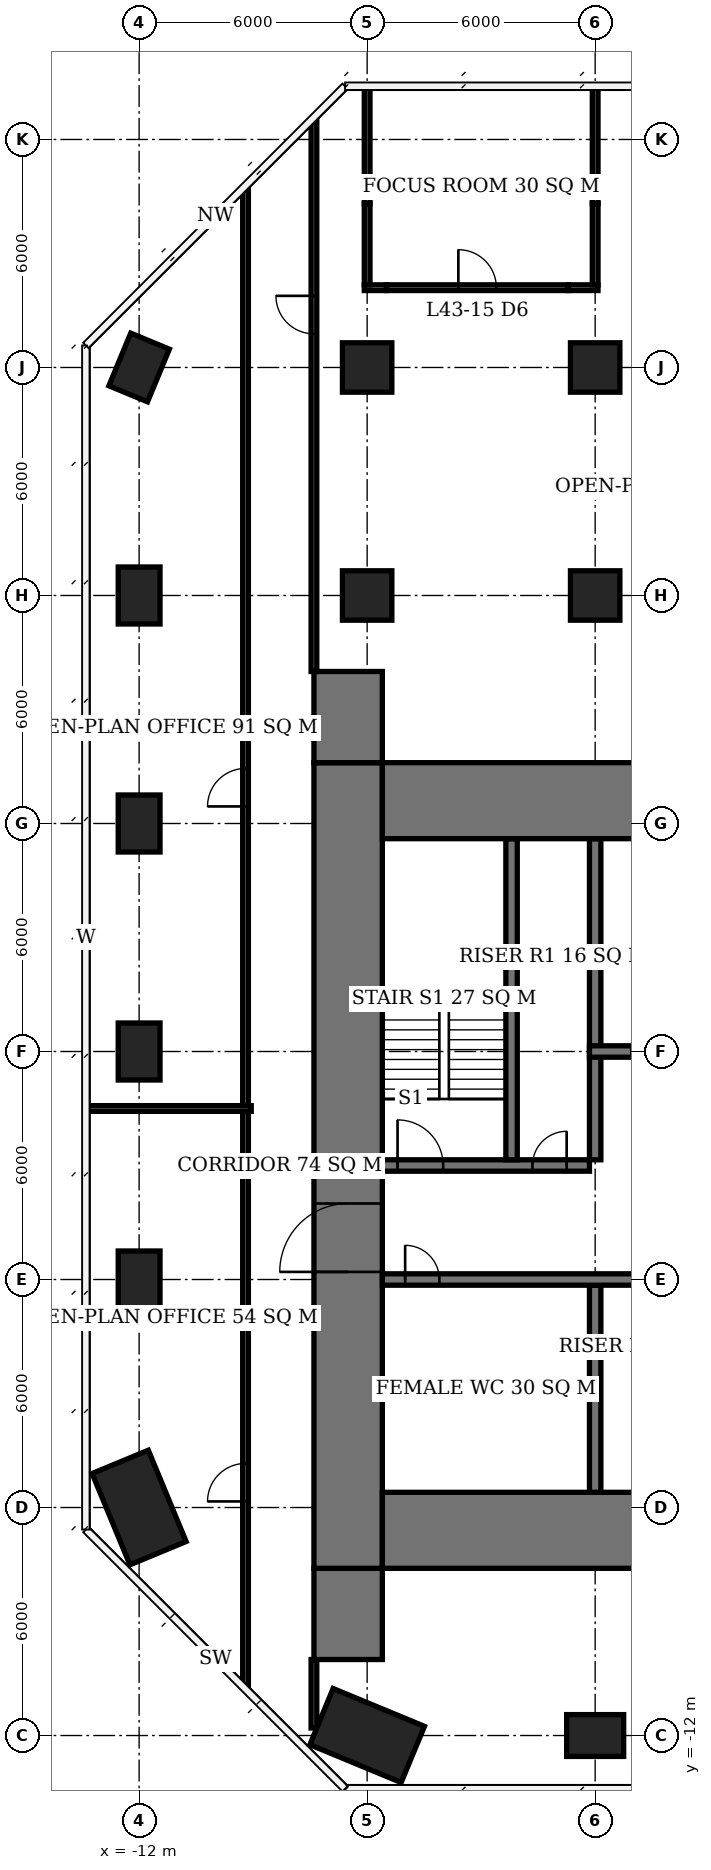
"""IFC4 building model, lengths in metres.
Left out: names, types, materials, properties, quantities, classifications, styles, units other than length and angle.
Written with IfcOpenShell. Run it as: python <this file> out.ifc"""

import sys

from ifc_helpers import new_model, si_unit, direction, frame, frame_2d, origin, origin_2d, place, context, subcontext, project, spatial, rectangle, extrude, element, fill, save


model = new_model("IFC4")
c1 = context("Model", 3, precision=1e-05, world=origin(), true_north=direction((0.0, 1.0)))
c2 = subcontext(c1, "Body", "Model", "MODEL_VIEW")
j1 = project(units=[si_unit("LENGTHUNIT", "METRE"), si_unit("PLANEANGLEUNIT", "RADIAN")], contexts=[c1])
p1 = place(None, origin())
s1 = spatial("IfcSite", under=j1, at=p1, CompositionType="ELEMENT")
p2 = place(p1, origin())
s2 = spatial("IfcBuilding", under=s1, at=p2, CompositionType="ELEMENT")
p3 = place(p2, frame((0.0, 0.0, 177.2)))
s3 = spatial("IfcBuildingStorey", under=s2, at=p3, CompositionType="ELEMENT", Elevation=177.2)
p4 = place(p3, frame((-12.0, -6.0, 0.0), z_axis=(0.0, 0.0, 1.0), x_axis=(-0.382683432365, 0.923879532511, 0.0)))
e1 = element("IfcColumn", 1, at=p4, inside=s3, PredefinedType="COLUMN", context=c2, shape_type="SweptSolid", body=[
    extrude(rectangle(XDim=2.6, YDim=1.6, at=origin_2d()), origin(), (0.0, 0.0, 1.0), 3.9),
])
for number, where, z_axis, x_axis in (
    (2, (-12.0, 0.0, 0.0), (0.0, 0.0, 1.0), (0.0, 1.0, 0.0)),
    (3, (-12.0, 6.0, 0.0), (0.0, 0.0, 1.0), (0.0, 1.0, 0.0)),
    (4, (-12.0, 12.0, 0.0), (0.0, 0.0, 1.0), (0.0, 1.0, 0.0)),
    (5, (-12.0, 18.0, 0.0), (0.0, 0.0, 1.0), (0.0, 1.0, 0.0)),
    (6, (-12.0, 24.0, 0.0), (0.0, 0.0, 1.0), (0.383, 0.924, 0.0)),
):
    element("IfcColumn", number, at=place(p3, frame(where, z_axis=z_axis, x_axis=x_axis)), inside=s3, PredefinedType="COLUMN", context=c2, shape_type="SweptSolid", body=[
        extrude(rectangle(XDim=1.5, YDim=1.1, at=origin_2d()), origin(), (0.0, 0.0, 1.0), 3.9),
    ])
p5 = place(p3, frame((-6.0, -12.0, 0.0), z_axis=(0.0, 0.0, 1.0), x_axis=(-0.923879532511, 0.382683432365, 0.0)))
e7 = element("IfcColumn", 7, at=p5, inside=s3, PredefinedType="COLUMN", context=c2, shape_type="SweptSolid", body=[
    extrude(rectangle(XDim=2.6, YDim=1.6, at=origin_2d()), origin(), (0.0, 0.0, 1.0), 3.9),
])
for number, where, z_axis, x_axis in (
    (8, (-6.0, 18.0, 0.0), (0.0, 0.0, 1.0), (1.0, 0.0, 0.0)),
    (9, (-6.0, 24.0, 0.0), (0.0, 0.0, 1.0), (1.0, 0.0, 0.0)),
):
    element("IfcColumn", number, at=place(p3, frame(where, z_axis=z_axis, x_axis=x_axis)), inside=s3, PredefinedType="COLUMN", context=c2, shape_type="SweptSolid", body=[
        extrude(rectangle(XDim=1.3, YDim=1.3, at=origin_2d()), origin(), (0.0, 0.0, 1.0), 3.9),
    ])
p6 = place(p3, frame((0.0, -12.0, 0.0), z_axis=(0.0, 0.0, 1.0), x_axis=(1.0, 0.0, 0.0)))
e10 = element("IfcColumn", 10, at=p6, inside=s3, PredefinedType="COLUMN", context=c2, shape_type="SweptSolid", body=[
    extrude(rectangle(XDim=1.5, YDim=1.1, at=origin_2d()), origin(), (0.0, 0.0, 1.0), 3.9),
])
for number, where, z_axis, x_axis in (
    (11, (0.0, 18.0, 0.0), (0.0, 0.0, 1.0), (1.0, 0.0, 0.0)),
    (12, (0.0, 24.0, 0.0), (0.0, 0.0, 1.0), (1.0, 0.0, 0.0)),
):
    element("IfcColumn", number, at=place(p3, frame(where, z_axis=z_axis, x_axis=x_axis)), inside=s3, PredefinedType="COLUMN", context=c2, shape_type="SweptSolid", body=[
        extrude(rectangle(XDim=1.3, YDim=1.3, at=origin_2d()), origin(), (0.0, 0.0, 1.0), 3.9),
    ])
for number, where, z_axis, x_axis in (
    (13, (-5.6, -6.6, 0.0), (0.0, 0.0, 1.0), (1.0, 0.0, 0.0)),
    (14, (-5.6, 12.6, 0.0), (0.0, 0.0, 1.0), (1.0, 0.0, 0.0)),
):
    element("IfcWall", number, at=place(p3, frame(where, z_axis=z_axis, x_axis=x_axis)), inside=s3, PredefinedType="SHEAR", context=c2, shape_type="SweptSolid", body=[
        extrude(rectangle(XDim=23.2, YDim=2.0, at=frame_2d((11.6, 0.0))), origin(), (0.0, 0.0, 1.0), 3.9),
    ])
p7 = place(p3, frame((-6.5, -7.6, 0.0), z_axis=(0.0, 0.0, 1.0), x_axis=(0.0, 1.0, 0.0)))
e15 = element("IfcWall", 15, at=p7, inside=s3, PredefinedType="SHEAR", context=c2, shape_type="SweptSolid", body=[
    extrude(rectangle(XDim=21.2, YDim=1.8, at=frame_2d((10.6, 0.0))), origin(), (0.0, 0.0, 1.0), 3.9),
])
p8 = place(p7, frame((7.8, 0.0, 0.0)))
e16 = element("IfcOpeningElement", 16, at=p8, cuts=e15, PredefinedType="OPENING", context=c2, shape_type="SweptSolid", body=[
    extrude(rectangle(XDim=1.8, YDim=2.4, at=frame_2d((0.9, 1.2))), frame((0.0, 0.91, 0.0), z_axis=(0.0, -1.0, 0.0), x_axis=(1.0, 0.0, 0.0)), (0.0, 0.0, 1.0), 1.82),
])
for number, where, z_axis, x_axis in (
    (17, (-6.5, -10.0, 0.0), (0.0, 0.0, 1.0), (0.0, 1.0, 0.0)),
    (18, (-6.5, 13.6, 0.0), (0.0, 0.0, 1.0), (0.0, 1.0, 0.0)),
):
    element("IfcWall", number, at=place(p3, frame(where, z_axis=z_axis, x_axis=x_axis)), inside=s3, PredefinedType="SHEAR", context=c2, shape_type="SweptSolid", body=[
        extrude(rectangle(XDim=2.4, YDim=1.8, at=frame_2d((1.2, 0.0))), origin(), (0.0, 0.0, 1.0), 3.9),
    ])
p9 = place(p3, frame((-5.6, 0.0, 0.0), z_axis=(0.0, 0.0, 1.0), x_axis=(1.0, 0.0, 0.0)))
e19 = element("IfcWall", 19, at=p9, inside=s3, PredefinedType="SHEAR", context=c2, shape_type="SweptSolid", body=[
    extrude(rectangle(XDim=17.75, YDim=0.3, at=frame_2d((8.875, 0.0))), origin(), (0.0, 0.0, 1.0), 3.9),
])
p10 = place(p9, frame((0.6, 0.0, 0.0)))
e20 = element("IfcOpeningElement", 20, at=p10, cuts=e19, PredefinedType="OPENING", context=c2, shape_type="SweptSolid", body=[
    extrude(rectangle(XDim=0.9, YDim=2.1, at=frame_2d((0.45, 1.05))), frame((0.0, 0.16, 0.0), z_axis=(0.0, -1.0, 0.0), x_axis=(1.0, 0.0, 0.0)), (0.0, 0.0, 1.0), 0.32),
])
p11 = place(p9, frame((9.6, 0.0, 0.0)))
e21 = element("IfcOpeningElement", 21, at=p11, cuts=e19, PredefinedType="OPENING", context=c2, shape_type="SweptSolid", body=[
    extrude(rectangle(XDim=1.0, YDim=2.1, at=frame_2d((0.5, 1.05))), frame((0.0, 0.16, 0.0), z_axis=(0.0, -1.0, 0.0), x_axis=(1.0, 0.0, 0.0)), (0.0, 0.0, 1.0), 0.32),
])
p12 = place(p9, frame((12.55, 0.0, 0.0)))
e22 = element("IfcOpeningElement", 22, at=p12, cuts=e19, PredefinedType="OPENING", context=c2, shape_type="SweptSolid", body=[
    extrude(rectangle(XDim=1.1, YDim=2.1, at=frame_2d((0.55, 1.05))), frame((0.0, 0.16, 0.0), z_axis=(0.0, -1.0, 0.0), x_axis=(1.0, 0.0, 0.0)), (0.0, 0.0, 1.0), 0.32),
])
p13 = place(p9, frame((15.55, 0.0, 0.0)))
e23 = element("IfcOpeningElement", 23, at=p13, cuts=e19, PredefinedType="OPENING", context=c2, shape_type="SweptSolid", body=[
    extrude(rectangle(XDim=1.1, YDim=2.1, at=frame_2d((0.55, 1.05))), frame((0.0, 0.16, 0.0), z_axis=(0.0, -1.0, 0.0), x_axis=(1.0, 0.0, 0.0)), (0.0, 0.0, 1.0), 0.32),
])
p14 = place(p3, frame((-5.6, 3.0, 0.0), z_axis=(0.0, 0.0, 1.0), x_axis=(1.0, 0.0, 0.0)))
e24 = element("IfcWall", 24, at=p14, inside=s3, PredefinedType="SHEAR", context=c2, shape_type="SweptSolid", body=[
    extrude(rectangle(XDim=5.45, YDim=0.3, at=frame_2d((2.725, 0.0))), origin(), (0.0, 0.0, 1.0), 3.9),
])
p15 = place(p14, frame((0.4, 0.0, 0.0)))
e25 = element("IfcOpeningElement", 25, at=p15, cuts=e24, PredefinedType="OPENING", context=c2, shape_type="SweptSolid", body=[
    extrude(rectangle(XDim=1.2, YDim=2.1, at=frame_2d((0.6, 1.05))), frame((0.0, 0.16, 0.0), z_axis=(0.0, -1.0, 0.0), x_axis=(1.0, 0.0, 0.0)), (0.0, 0.0, 1.0), 0.32),
])
p16 = place(p14, frame((3.95, 0.0, 0.0)))
e26 = element("IfcOpeningElement", 26, at=p16, cuts=e24, PredefinedType="OPENING", context=c2, shape_type="SweptSolid", body=[
    extrude(rectangle(XDim=0.9, YDim=2.1, at=frame_2d((0.45, 1.05))), frame((0.0, 0.16, 0.0), z_axis=(0.0, -1.0, 0.0), x_axis=(1.0, 0.0, 0.0)), (0.0, 0.0, 1.0), 0.32),
])
p17 = place(p3, frame((-0.15, 6.0, 0.0), z_axis=(0.0, 0.0, 1.0), x_axis=(1.0, 0.0, 0.0)))
e27 = element("IfcWall", 27, at=p17, inside=s3, PredefinedType="SHEAR", context=c2, shape_type="SweptSolid", body=[
    extrude(rectangle(XDim=17.75, YDim=0.3, at=frame_2d((8.875, 0.0))), origin(), (0.0, 0.0, 1.0), 3.9),
])
p18 = place(p17, frame((13.15, 0.0, 0.0)))
e28 = element("IfcOpeningElement", 28, at=p18, cuts=e27, PredefinedType="OPENING", context=c2, shape_type="SweptSolid", body=[
    extrude(rectangle(XDim=0.9, YDim=2.1, at=frame_2d((0.45, 1.05))), frame((0.0, 0.16, 0.0), z_axis=(0.0, -1.0, 0.0), x_axis=(1.0, 0.0, 0.0)), (0.0, 0.0, 1.0), 0.32),
])
p19 = place(p17, frame((16.25, 0.0, 0.0)))
e29 = element("IfcOpeningElement", 29, at=p19, cuts=e27, PredefinedType="OPENING", context=c2, shape_type="SweptSolid", body=[
    extrude(rectangle(XDim=1.0, YDim=2.1, at=frame_2d((0.5, 1.05))), frame((0.0, 0.16, 0.0), z_axis=(0.0, -1.0, 0.0), x_axis=(1.0, 0.0, 0.0)), (0.0, 0.0, 1.0), 0.32),
])
p20 = place(p17, frame((7.25, 0.0, 0.0)))
e30 = element("IfcOpeningElement", 30, at=p20, cuts=e27, PredefinedType="OPENING", context=c2, shape_type="SweptSolid", body=[
    extrude(rectangle(XDim=1.0, YDim=2.1, at=frame_2d((0.5, 1.05))), frame((0.0, 0.16, 0.0), z_axis=(0.0, -1.0, 0.0), x_axis=(1.0, 0.0, 0.0)), (0.0, 0.0, 1.0), 0.32),
])
p21 = place(p17, frame((1.1, 0.0, 0.0)))
e31 = element("IfcOpeningElement", 31, at=p21, cuts=e27, PredefinedType="OPENING", context=c2, shape_type="SweptSolid", body=[
    extrude(rectangle(XDim=1.1, YDim=2.1, at=frame_2d((0.55, 1.05))), frame((0.0, 0.16, 0.0), z_axis=(0.0, -1.0, 0.0), x_axis=(1.0, 0.0, 0.0)), (0.0, 0.0, 1.0), 0.32),
])
p22 = place(p17, frame((4.1, 0.0, 0.0)))
e32 = element("IfcOpeningElement", 32, at=p22, cuts=e27, PredefinedType="OPENING", context=c2, shape_type="SweptSolid", body=[
    extrude(rectangle(XDim=1.1, YDim=2.1, at=frame_2d((0.55, 1.05))), frame((0.0, 0.16, 0.0), z_axis=(0.0, -1.0, 0.0), x_axis=(1.0, 0.0, 0.0)), (0.0, 0.0, 1.0), 0.32),
])
p23 = place(p3, frame((0.0, -5.6, 0.0), z_axis=(0.0, 0.0, 1.0), x_axis=(0.0, 1.0, 0.0)))
e33 = element("IfcWall", 33, at=p23, inside=s3, PredefinedType="SHEAR", context=c2, shape_type="SweptSolid", body=[
    extrude(rectangle(XDim=5.45, YDim=0.3, at=frame_2d((2.725, 0.0))), origin(), (0.0, 0.0, 1.0), 3.9),
])
for number, where, z_axis, x_axis in (
    (34, (0.0, 3.15, 0.0), (0.0, 0.0, 1.0), (0.0, 1.0, 0.0)),
    (35, (-2.2, 3.15, 0.0), (0.0, 0.0, 1.0), (0.0, 1.0, 0.0)),
):
    element("IfcWall", number, at=place(p3, frame(where, z_axis=z_axis, x_axis=x_axis)), inside=s3, PredefinedType="SHEAR", context=c2, shape_type="SweptSolid", body=[
        extrude(rectangle(XDim=8.45, YDim=0.3, at=frame_2d((4.225, 0.0))), origin(), (0.0, 0.0, 1.0), 3.9),
    ])
p24 = place(p3, frame((-6.075, 26.1, 0.0), z_axis=(0.0, 0.0, 1.0), x_axis=(1.0, 0.0, 0.0)))
e36 = element("IfcWall", 36, at=p24, inside=s3, PredefinedType="PARTITIONING", context=c2, shape_type="SweptSolid", body=[
    extrude(rectangle(XDim=0.585, YDim=0.15, at=frame_2d((0.292, 0.0))), origin(), (0.0, 0.0, 1.0), 2.65),
])
p25 = place(p3, frame((-5.49, 26.1, 0.0), z_axis=(0.0, 0.0, 1.0), x_axis=(1.0, 0.0, 0.0)))
e37 = element("IfcWall", 37, at=p25, inside=s3, PredefinedType="PARTITIONING", context=c2, shape_type="SweptSolid", body=[
    extrude(rectangle(XDim=4.78, YDim=0.15, at=frame_2d((2.39, 0.0))), origin(), (0.0, 0.0, 1.0), 3.65),
])
p26 = place(p25, frame((1.89, 0.0, 0.0)))
e38 = element("IfcOpeningElement", 38, at=p26, cuts=e37, PredefinedType="OPENING", context=c2, shape_type="SweptSolid", body=[
    extrude(rectangle(XDim=1.0, YDim=2.1, at=frame_2d((0.5, 1.05))), frame((0.0, 0.085, 0.0), z_axis=(0.0, -1.0, 0.0), x_axis=(1.0, 0.0, 0.0)), (0.0, 0.0, 1.0), 0.17),
])
p27 = place(p3, frame((-0.71, 26.1, 0.0), z_axis=(0.0, 0.0, 1.0), x_axis=(1.0, 0.0, 0.0)))
e39 = element("IfcWall", 39, at=p27, inside=s3, PredefinedType="PARTITIONING", context=c2, shape_type="SweptSolid", body=[
    extrude(rectangle(XDim=0.785, YDim=0.15, at=frame_2d((0.393, 0.0))), origin(), (0.0, 0.0, 1.0), 2.65),
])
p28 = place(p3, frame((-6.0, 26.175, 0.0), z_axis=(0.0, 0.0, 1.0), x_axis=(0.0, 1.0, 0.0)))
e40 = element("IfcWall", 40, at=p28, inside=s3, PredefinedType="PARTITIONING", context=c2, shape_type="SweptSolid", body=[
    extrude(rectangle(XDim=2.135, YDim=0.15, at=frame_2d((1.067, 0.0))), origin(), (0.0, 0.0, 1.0), 2.65),
])
p29 = place(p3, frame((-6.0, 28.31, 0.0), z_axis=(0.0, 0.0, 1.0), x_axis=(0.0, 1.0, 0.0)))
e41 = element("IfcWall", 41, at=p29, inside=s3, PredefinedType="PARTITIONING", context=c2, shape_type="SweptSolid", body=[
    extrude(rectangle(XDim=3.09, YDim=0.15, at=frame_2d((1.545, 0.0))), origin(), (0.0, 0.0, 1.0), 3.65),
])
p30 = place(p3, frame((0.0, 26.175, 0.0), z_axis=(0.0, 0.0, 1.0), x_axis=(0.0, 1.0, 0.0)))
e42 = element("IfcWall", 42, at=p30, inside=s3, PredefinedType="PARTITIONING", context=c2, shape_type="SweptSolid", body=[
    extrude(rectangle(XDim=2.135, YDim=0.15, at=frame_2d((1.067, 0.0))), origin(), (0.0, 0.0, 1.0), 2.65),
])
p31 = place(p3, frame((0.0, 28.31, 0.0), z_axis=(0.0, 0.0, 1.0), x_axis=(0.0, 1.0, 0.0)))
e43 = element("IfcWall", 43, at=p31, inside=s3, PredefinedType="PARTITIONING", context=c2, shape_type="SweptSolid", body=[
    extrude(rectangle(XDim=3.09, YDim=0.15, at=frame_2d((1.545, 0.0))), origin(), (0.0, 0.0, 1.0), 3.65),
])
p32 = place(p3, frame((-13.4, 4.5, 0.0), z_axis=(0.0, 0.0, 1.0), x_axis=(1.0, 0.0, 0.0)))
e44 = element("IfcWall", 44, at=p32, inside=s3, PredefinedType="PARTITIONING", context=c2, shape_type="SweptSolid", body=[
    extrude(rectangle(XDim=4.35, YDim=0.15, at=frame_2d((2.175, 0.0))), origin(), (0.0, 0.0, 1.0), 3.65),
])
p33 = place(p3, frame((-9.2, -10.689, 0.0), z_axis=(0.0, 0.0, 1.0), x_axis=(0.0, 1.0, 0.0)))
e45 = element("IfcWall", 45, at=p33, inside=s3, PredefinedType="PARTITIONING", context=c2, shape_type="SweptSolid", body=[
    extrude(rectangle(XDim=15.114, YDim=0.15, at=frame_2d((7.557, 0.0))), origin(), (0.0, 0.0, 1.0), 3.65),
])
p34 = place(p33, frame((4.849, 0.0, 0.0)))
e46 = element("IfcOpeningElement", 46, at=p34, cuts=e45, PredefinedType="OPENING", context=c2, shape_type="SweptSolid", body=[
    extrude(rectangle(XDim=1.0, YDim=2.1, at=frame_2d((0.5, 1.05))), frame((0.0, 0.085, 0.0), z_axis=(0.0, -1.0, 0.0), x_axis=(1.0, 0.0, 0.0)), (0.0, 0.0, 1.0), 0.17),
])
p35 = place(p3, frame((-9.2, 4.575, 0.0), z_axis=(0.0, 0.0, 1.0), x_axis=(0.0, 1.0, 0.0)))
e47 = element("IfcWall", 47, at=p35, inside=s3, PredefinedType="PARTITIONING", context=c2, shape_type="SweptSolid", body=[
    extrude(rectangle(XDim=24.114, YDim=0.15, at=frame_2d((12.057, 0.0))), origin(), (0.0, 0.0, 1.0), 3.65),
])
p36 = place(p35, frame((7.874, 0.0, 0.0)))
e48 = element("IfcOpeningElement", 48, at=p36, cuts=e47, PredefinedType="OPENING", context=c2, shape_type="SweptSolid", body=[
    extrude(rectangle(XDim=1.0, YDim=2.1, at=frame_2d((0.5, 1.05))), frame((0.0, 0.085, 0.0), z_axis=(0.0, -1.0, 0.0), x_axis=(1.0, 0.0, 0.0)), (0.0, 0.0, 1.0), 0.17),
])
p37 = place(p3, frame((-7.4, -11.802, 0.0), z_axis=(0.0, 0.0, 1.0), x_axis=(0.0, 1.0, 0.0)))
e49 = element("IfcWall", 49, at=p37, inside=s3, PredefinedType="PARTITIONING", context=c2, shape_type="SweptSolid", body=[
    extrude(rectangle(XDim=1.802, YDim=0.15, at=frame_2d((0.901, 0.0))), origin(), (0.0, 0.0, 1.0), 3.65),
])
p38 = place(p3, frame((-7.4, 16.0, 0.0), z_axis=(0.0, 0.0, 1.0), x_axis=(0.0, 1.0, 0.0)))
e50 = element("IfcWall", 50, at=p38, inside=s3, PredefinedType="PARTITIONING", context=c2, shape_type="SweptSolid", body=[
    extrude(rectangle(XDim=14.489, YDim=0.15, at=frame_2d((7.245, 0.0))), origin(), (0.0, 0.0, 1.0), 3.65),
])
p39 = place(p38, frame((8.885, 0.0, 0.0)))
e51 = element("IfcOpeningElement", 51, at=p39, cuts=e50, PredefinedType="OPENING", context=c2, shape_type="SweptSolid", body=[
    extrude(rectangle(XDim=1.0, YDim=2.1, at=frame_2d((0.5, 1.05))), frame((0.0, 0.085, 0.0), z_axis=(0.0, -1.0, 0.0), x_axis=(1.0, 0.0, 0.0)), (0.0, 0.0, 1.0), 0.17),
])
p40 = place(p8, origin())
e52 = element("IfcDoor", 52, at=p40, inside=s3, OperationType="DOUBLE_DOOR_SINGLE_SWING", PredefinedType="DOOR", context=c2, shape_type="SweptSolid", body=[
    extrude(rectangle(XDim=1.8, YDim=2.4, at=frame_2d((0.9, 1.2))), frame((0.0, 0.025, 0.0), z_axis=(0.0, -1.0, 0.0), x_axis=(1.0, 0.0, 0.0)), (0.0, 0.0, 1.0), 0.05),
])
fill(e16, e52)
p41 = place(p15, origin())
e53 = element("IfcDoor", 53, at=p41, inside=s3, OperationType="SINGLE_SWING_LEFT", PredefinedType="DOOR", context=c2, shape_type="SweptSolid", body=[
    extrude(rectangle(XDim=1.2, YDim=2.1, at=frame_2d((0.6, 1.05))), frame((0.0, 0.025, 0.0), z_axis=(0.0, -1.0, 0.0), x_axis=(1.0, 0.0, 0.0)), (0.0, 0.0, 1.0), 0.05),
])
fill(e25, e53)
p42 = place(p16, origin())
e54 = element("IfcDoor", 54, at=p42, inside=s3, OperationType="SINGLE_SWING_RIGHT", PredefinedType="DOOR", context=c2, shape_type="SweptSolid", body=[
    extrude(rectangle(XDim=0.9, YDim=2.1, at=frame_2d((0.45, 1.05))), frame((0.0, 0.025, 0.0), z_axis=(0.0, -1.0, 0.0), x_axis=(1.0, 0.0, 0.0)), (0.0, 0.0, 1.0), 0.05),
])
fill(e26, e54)
p43 = place(p10, origin())
e55 = element("IfcDoor", 55, at=p43, inside=s3, OperationType="SINGLE_SWING_LEFT", PredefinedType="DOOR", context=c2, shape_type="SweptSolid", body=[
    extrude(rectangle(XDim=0.9, YDim=2.1, at=frame_2d((0.45, 1.05))), frame((0.0, 0.025, 0.0), z_axis=(0.0, -1.0, 0.0), x_axis=(1.0, 0.0, 0.0)), (0.0, 0.0, 1.0), 0.05),
])
fill(e20, e55)
p44 = place(p26, origin())
e56 = element("IfcDoor", 56, at=p44, inside=s3, OperationType="SINGLE_SWING_LEFT", PredefinedType="DOOR", context=c2, shape_type="SweptSolid", body=[
    extrude(rectangle(XDim=1.0, YDim=2.1, at=frame_2d((0.5, 1.05))), frame((0.0, 0.025, 0.0), z_axis=(0.0, -1.0, 0.0), x_axis=(1.0, 0.0, 0.0)), (0.0, 0.0, 1.0), 0.05),
])
fill(e38, e56)
p45 = place(p34, origin())
e57 = element("IfcDoor", 57, at=p45, inside=s3, OperationType="SINGLE_SWING_LEFT", PredefinedType="DOOR", context=c2, shape_type="SweptSolid", body=[
    extrude(rectangle(XDim=1.0, YDim=2.1, at=frame_2d((0.5, 1.05))), frame((0.0, 0.025, 0.0), z_axis=(0.0, -1.0, 0.0), x_axis=(1.0, 0.0, 0.0)), (0.0, 0.0, 1.0), 0.05),
])
fill(e46, e57)
p46 = place(p36, origin())
e58 = element("IfcDoor", 58, at=p46, inside=s3, OperationType="SINGLE_SWING_LEFT", PredefinedType="DOOR", context=c2, shape_type="SweptSolid", body=[
    extrude(rectangle(XDim=1.0, YDim=2.1, at=frame_2d((0.5, 1.05))), frame((0.0, 0.025, 0.0), z_axis=(0.0, -1.0, 0.0), x_axis=(1.0, 0.0, 0.0)), (0.0, 0.0, 1.0), 0.05),
])
fill(e48, e58)
p47 = place(p39, origin())
e59 = element("IfcDoor", 59, at=p47, inside=s3, OperationType="SINGLE_SWING_RIGHT", PredefinedType="DOOR", context=c2, shape_type="SweptSolid", body=[
    extrude(rectangle(XDim=1.0, YDim=2.1, at=frame_2d((0.5, 1.05))), frame((0.0, 0.025, 0.0), z_axis=(0.0, -1.0, 0.0), x_axis=(1.0, 0.0, 0.0)), (0.0, 0.0, 1.0), 0.05),
])
fill(e51, e59)
save(model, sys.argv[1])
